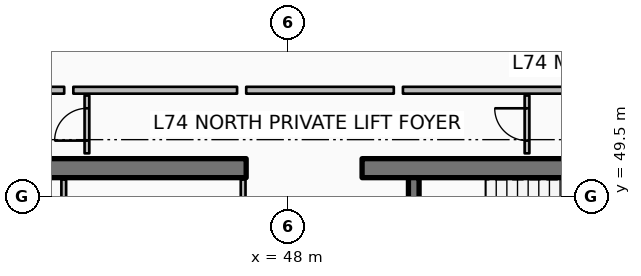
"""IFC4 building model, lengths in metres.
Left out: names, types, materials, properties, quantities, classifications, styles, units other than length and angle.
Written with IfcOpenShell. Run it as: python <this file> out.ifc"""

import sys

from ifc_helpers import new_model, si_unit, direction, frame, frame_2d, origin, place, context, subcontext, project, spatial, rectangle, extrude, element, fill, save


model = new_model("IFC4")
c1 = context("Model", 3, precision=1e-05, world=origin(), true_north=direction((0.0, 1.0)))
c2 = subcontext(c1, "Body", "Model", "MODEL_VIEW")
j1 = project(units=[si_unit("LENGTHUNIT", "METRE"), si_unit("PLANEANGLEUNIT", "RADIAN")], contexts=[c1])
p1 = place(None, origin())
s1 = spatial("IfcSite", under=j1, at=p1, CompositionType="ELEMENT")
p2 = place(p1, origin())
s2 = spatial("IfcBuilding", under=s1, at=p2, CompositionType="ELEMENT")
p3 = place(p2, frame((0.0, 0.0, 294.45)))
s3 = spatial("IfcBuildingStorey", under=s2, at=p3, CompositionType="ELEMENT", Elevation=294.45)
p4 = place(p3, frame((37.3, 50.25, 0.0), z_axis=(0.0, 0.0, 1.0), x_axis=(1.0, 0.0, 0.0)))
e1 = element("IfcWall", 1, at=p4, inside=s3, PredefinedType="SHEAR", context=c2, shape_type="SweptSolid", body=[
    extrude(rectangle(XDim=9.6, YDim=0.5, at=frame_2d((4.8, 0.0))), origin(), (0.0, 0.0, 1.0), 3.85),
])
p5 = place(p3, frame((49.95, 50.25, 0.0), z_axis=(0.0, 0.0, 1.0), x_axis=(1.0, 0.0, 0.0)))
e2 = element("IfcWall", 2, at=p5, inside=s3, PredefinedType="SHEAR", context=c2, shape_type="SweptSolid", body=[
    extrude(rectangle(XDim=9.6, YDim=0.5, at=frame_2d((4.8, 0.0))), origin(), (0.0, 0.0, 1.0), 3.85),
])
p6 = place(p3, frame((51.31, 46.5, 0.0), z_axis=(0.0, 0.0, 1.0), x_axis=(0.0, 1.0, 0.0)))
e3 = element("IfcWall", 3, at=p6, inside=s3, PredefinedType="SHEAR", context=c2, shape_type="SweptSolid", body=[
    extrude(rectangle(XDim=3.5, YDim=0.28, at=frame_2d((1.75, 0.0))), origin(), (0.0, 0.0, 1.0), 3.85),
])
for number, where, z_axis, x_axis in (
    (4, (46.82, 47.92, 0.0), (0.0, 0.0, 1.0), (0.0, 1.0, 0.0)),
    (5, (42.1, 47.92, 0.0), (0.0, 0.0, 1.0), (0.0, 1.0, 0.0)),
):
    element("IfcWall", number, at=place(p3, frame(where, z_axis=z_axis, x_axis=x_axis)), inside=s3, PredefinedType="PARTITIONING", context=c2, shape_type="SweptSolid", body=[
        extrude(rectangle(XDim=2.03, YDim=0.125, at=frame_2d((1.015, 0.0))), origin(), (0.0, 0.0, 1.0), 3.03),
    ])
p7 = place(p3, frame((42.71, 50.64, 0.0), z_axis=(0.0, 0.0, 1.0), x_axis=(0.0, 1.0, 0.0)))
e6 = element("IfcWall", 6, at=p7, inside=s3, PredefinedType="PARTITIONING", context=c2, shape_type="SweptSolid", body=[
    extrude(rectangle(XDim=1.52, YDim=0.125, at=frame_2d((0.76, 0.0))), origin(), (0.0, 0.0, 1.0), 2.957),
])
p8 = place(p7, frame((0.335, 0.0, 0.0)))
e7 = element("IfcOpeningElement", 7, at=p8, cuts=e6, PredefinedType="OPENING", context=c2, shape_type="SweptSolid", body=[
    extrude(rectangle(XDim=0.85, YDim=2.06, at=frame_2d((0.425, 1.03))), frame((0.0, 0.073, 0.0), z_axis=(0.0, -1.0, 0.0), x_axis=(1.0, 0.0, 0.0)), (0.0, 0.0, 1.0), 0.145),
])
p9 = place(p3, frame((54.29, 50.64, 0.0), z_axis=(0.0, 0.0, 1.0), x_axis=(0.0, 1.0, 0.0)))
e8 = element("IfcWall", 8, at=p9, inside=s3, PredefinedType="PARTITIONING", context=c2, shape_type="SweptSolid", body=[
    extrude(rectangle(XDim=1.52, YDim=0.125, at=frame_2d((0.76, 0.0))), origin(), (0.0, 0.0, 1.0), 3.03),
])
p10 = place(p9, frame((0.335, 0.0, 0.0)))
e9 = element("IfcOpeningElement", 9, at=p10, cuts=e8, PredefinedType="OPENING", context=c2, shape_type="SweptSolid", body=[
    extrude(rectangle(XDim=0.85, YDim=2.06, at=frame_2d((0.425, 1.03))), frame((0.0, 0.073, 0.0), z_axis=(0.0, -1.0, 0.0), x_axis=(1.0, 0.0, 0.0)), (0.0, 0.0, 1.0), 0.145),
])
p11 = place(p3, frame((56.0, 52.3, 0.0), z_axis=(0.0, 0.0, 1.0), x_axis=(-1.0, 0.0, 0.0)))
e10 = element("IfcWall", 10, at=p11, inside=s3, PredefinedType="PARTITIONING", context=c2, shape_type="SweptSolid", body=[
    extrude(rectangle(XDim=4.975, YDim=0.18, at=frame_2d((2.488, 0.0))), origin(), (0.0, 0.0, 1.0), 2.957),
])
p12 = place(p3, frame((50.785, 52.3, 0.0), z_axis=(0.0, 0.0, 1.0), x_axis=(-1.0, 0.0, 0.0)))
e11 = element("IfcWall", 11, at=p12, inside=s3, PredefinedType="PARTITIONING", context=c2, shape_type="SweptSolid", body=[
    extrude(rectangle(XDim=3.884, YDim=0.18, at=frame_2d((1.942, 0.0))), origin(), (0.0, 0.0, 1.0), 2.957),
])
p13 = place(p3, frame((46.661, 52.3, 0.0), z_axis=(0.0, 0.0, 1.0), x_axis=(-1.0, 0.0, 0.0)))
e12 = element("IfcWall", 12, at=p13, inside=s3, PredefinedType="PARTITIONING", context=c2, shape_type="SweptSolid", body=[
    extrude(rectangle(XDim=4.309, YDim=0.18, at=frame_2d((2.155, 0.0))), origin(), (0.0, 0.0, 1.0), 2.957),
])
p14 = place(p3, frame((42.112, 52.3, 0.0), z_axis=(0.0, 0.0, 1.0), x_axis=(-1.0, 0.0, 0.0)))
e13 = element("IfcWall", 13, at=p14, inside=s3, PredefinedType="PARTITIONING", context=c2, shape_type="SweptSolid", body=[
    extrude(rectangle(XDim=4.692, YDim=0.18, at=frame_2d((2.346, 0.0))), origin(), (0.0, 0.0, 1.0), 2.957),
])
p15 = place(p8, origin())
e14 = element("IfcDoor", 14, at=p15, inside=s3, OperationType="SINGLE_SWING_LEFT", PredefinedType="DOOR", context=c2, shape_type="SweptSolid", body=[
    extrude(rectangle(XDim=0.85, YDim=2.06, at=frame_2d((0.425, 1.03))), frame((0.0, 0.025, 0.0), z_axis=(0.0, -1.0, 0.0), x_axis=(1.0, 0.0, 0.0)), (0.0, 0.0, 1.0), 0.05),
])
fill(e7, e14)
p16 = place(p10, origin())
e15 = element("IfcDoor", 15, at=p16, inside=s3, OperationType="SINGLE_SWING_RIGHT", PredefinedType="DOOR", context=c2, shape_type="SweptSolid", body=[
    extrude(rectangle(XDim=0.85, YDim=2.06, at=frame_2d((0.425, 1.03))), frame((0.0, 0.025, 0.0), z_axis=(0.0, -1.0, 0.0), x_axis=(1.0, 0.0, 0.0)), (0.0, 0.0, 1.0), 0.05),
])
fill(e9, e15)
save(model, sys.argv[1])
